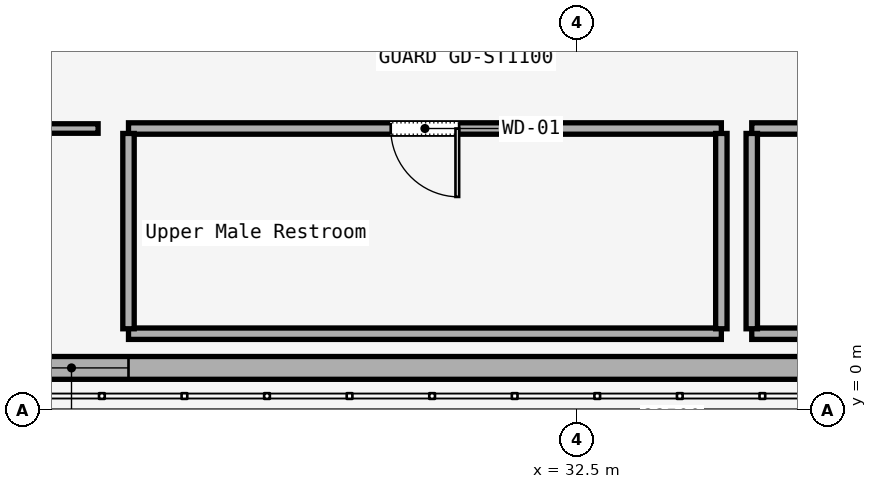
"""IFC4 building model, lengths in metres.
Left out: names, types, materials, properties, quantities, classifications, styles, units other than length and angle.
Written with IfcOpenShell. Run it as: python <this file> out.ifc"""

import sys

from ifc_helpers import new_model, si_unit, direction, frame, frame_2d, origin, place, context, subcontext, project, spatial, rectangle, extrude, element, fill, save


model = new_model("IFC4")
c1 = context("Model", 3, precision=1e-05, world=origin(), true_north=direction((0.0, 1.0)))
c2 = subcontext(c1, "Body", "Model", "MODEL_VIEW")
j1 = project(units=[si_unit("LENGTHUNIT", "METRE"), si_unit("PLANEANGLEUNIT", "RADIAN")], contexts=[c1])
p1 = place(None, origin())
s1 = spatial("IfcSite", under=j1, at=p1, CompositionType="ELEMENT")
p2 = place(p1, origin())
s2 = spatial("IfcBuilding", under=s1, at=p2, CompositionType="ELEMENT")
p3 = place(p2, frame((0.0, 0.0, 18.0)))
s3 = spatial("IfcBuildingStorey", under=s2, at=p3, CompositionType="ELEMENT", Elevation=18.0)
p4 = place(p3, frame((2.3, 0.55, 0.0), z_axis=(0.0, 0.0, 1.0), x_axis=(1.0, 0.0, 0.0)))
e1 = element("IfcWall", 1, at=p4, inside=s3, PredefinedType="SOLIDWALL", context=c2, shape_type="SweptSolid", body=[
    extrude(rectangle(XDim=79.4, YDim=0.3, at=frame_2d((39.7, 0.0))), origin(), (0.0, 0.0, 1.0), 5.7),
])
p5 = place(p4, frame((5.8, 0.0, 1.0)))
e2 = element("IfcOpeningElement", 2, at=p5, cuts=e1, PredefinedType="OPENING", context=c2, shape_type="SweptSolid", body=[
    extrude(rectangle(XDim=1.5, YDim=1.8, at=frame_2d((0.75, 0.9))), frame((0.0, 0.15, 0.0), z_axis=(0.0, -1.0, 0.0), x_axis=(1.0, 0.0, 0.0)), (0.0, 0.0, 1.0), 0.3),
])
p6 = place(p4, frame((12.6, 0.0, 1.0)))
e3 = element("IfcOpeningElement", 3, at=p6, cuts=e1, PredefinedType="OPENING", context=c2, shape_type="SweptSolid", body=[
    extrude(rectangle(XDim=1.5, YDim=1.8, at=frame_2d((0.75, 0.9))), frame((0.0, 0.15, 0.0), z_axis=(0.0, -1.0, 0.0), x_axis=(1.0, 0.0, 0.0)), (0.0, 0.0, 1.0), 0.3),
])
p7 = place(p4, frame((22.8, 0.0, 1.0)))
e4 = element("IfcOpeningElement", 4, at=p7, cuts=e1, PredefinedType="OPENING", context=c2, shape_type="SweptSolid", body=[
    extrude(rectangle(XDim=1.5, YDim=1.8, at=frame_2d((0.75, 0.9))), frame((0.0, 0.15, 0.0), z_axis=(0.0, -1.0, 0.0), x_axis=(1.0, 0.0, 0.0)), (0.0, 0.0, 1.0), 0.3),
])
p8 = place(p4, frame((33.2, 0.0, 1.0)))
e5 = element("IfcOpeningElement", 5, at=p8, cuts=e1, PredefinedType="OPENING", context=c2, shape_type="SweptSolid", body=[
    extrude(rectangle(XDim=1.5, YDim=1.8, at=frame_2d((0.75, 0.9))), frame((0.0, 0.15, 0.0), z_axis=(0.0, -1.0, 0.0), x_axis=(1.0, 0.0, 0.0)), (0.0, 0.0, 1.0), 0.3),
])
p9 = place(p4, frame((44.8, 0.0, 1.0)))
e6 = element("IfcOpeningElement", 6, at=p9, cuts=e1, PredefinedType="OPENING", context=c2, shape_type="SweptSolid", body=[
    extrude(rectangle(XDim=1.5, YDim=1.8, at=frame_2d((0.75, 0.9))), frame((0.0, 0.15, 0.0), z_axis=(0.0, -1.0, 0.0), x_axis=(1.0, 0.0, 0.0)), (0.0, 0.0, 1.0), 0.3),
])
p10 = place(p4, frame((55.2, 0.0, 1.0)))
e7 = element("IfcOpeningElement", 7, at=p10, cuts=e1, PredefinedType="OPENING", context=c2, shape_type="SweptSolid", body=[
    extrude(rectangle(XDim=1.5, YDim=1.8, at=frame_2d((0.75, 0.9))), frame((0.0, 0.15, 0.0), z_axis=(0.0, -1.0, 0.0), x_axis=(1.0, 0.0, 0.0)), (0.0, 0.0, 1.0), 0.3),
])
p11 = place(p4, frame((66.4, 0.0, 1.0)))
e8 = element("IfcOpeningElement", 8, at=p11, cuts=e1, PredefinedType="OPENING", context=c2, shape_type="SweptSolid", body=[
    extrude(rectangle(XDim=1.5, YDim=1.8, at=frame_2d((0.75, 0.9))), frame((0.0, 0.15, 0.0), z_axis=(0.0, -1.0, 0.0), x_axis=(1.0, 0.0, 0.0)), (0.0, 0.0, 1.0), 0.3),
])
p12 = place(p4, frame((73.0, 0.0, 1.0)))
e9 = element("IfcOpeningElement", 9, at=p12, cuts=e1, PredefinedType="OPENING", context=c2, shape_type="SweptSolid", body=[
    extrude(rectangle(XDim=1.5, YDim=1.8, at=frame_2d((0.75, 0.9))), frame((0.0, 0.15, 0.0), z_axis=(0.0, -1.0, 0.0), x_axis=(1.0, 0.0, 0.0)), (0.0, 0.0, 1.0), 0.3),
])
p13 = place(p3, frame((42.6, 3.7, 0.0), z_axis=(0.0, 0.0, 1.0), x_axis=(-1.0, 0.0, 0.0)))
e10 = element("IfcWall", 10, at=p13, inside=s3, PredefinedType="PARTITIONING", context=c2, shape_type="SweptSolid", body=[
    extrude(rectangle(XDim=7.8, YDim=0.15, at=frame_2d((3.9, 0.0))), origin(), (0.0, 0.0, 1.0), 4.47),
])
p14 = place(p13, frame((3.45, 0.0, 0.0)))
e11 = element("IfcOpeningElement", 11, at=p14, cuts=e10, PredefinedType="OPENING", context=c2, shape_type="SweptSolid", body=[
    extrude(rectangle(XDim=0.9, YDim=2.15, at=frame_2d((0.45, 1.075))), frame((0.0, 0.075, 0.0), z_axis=(0.0, -1.0, 0.0), x_axis=(1.0, 0.0, 0.0)), (0.0, 0.0, 1.0), 0.15),
])
p15 = place(p3, frame((34.4, 3.7, 0.0), z_axis=(0.0, 0.0, 1.0), x_axis=(-1.0, 0.0, 0.0)))
e12 = element("IfcWall", 12, at=p15, inside=s3, PredefinedType="PARTITIONING", context=c2, shape_type="SweptSolid", body=[
    extrude(rectangle(XDim=7.8, YDim=0.15, at=frame_2d((3.9, 0.0))), origin(), (0.0, 0.0, 1.0), 4.47),
])
p16 = place(p15, frame((3.45, 0.0, 0.0)))
e13 = element("IfcOpeningElement", 13, at=p16, cuts=e12, PredefinedType="OPENING", context=c2, shape_type="SweptSolid", body=[
    extrude(rectangle(XDim=0.9, YDim=2.15, at=frame_2d((0.45, 1.075))), frame((0.0, 0.075, 0.0), z_axis=(0.0, -1.0, 0.0), x_axis=(1.0, 0.0, 0.0)), (0.0, 0.0, 1.0), 0.15),
])
p17 = place(p3, frame((26.2, 3.7, 0.0), z_axis=(0.0, 0.0, 1.0), x_axis=(-1.0, 0.0, 0.0)))
e14 = element("IfcWall", 14, at=p17, inside=s3, PredefinedType="PARTITIONING", context=c2, shape_type="SweptSolid", body=[
    extrude(rectangle(XDim=2.2, YDim=0.125, at=frame_2d((1.1, 0.0))), origin(), (0.0, 0.0, 1.0), 4.47),
])
p18 = place(p3, frame((34.4, 1.0, 0.0), z_axis=(0.0, 0.0, 1.0), x_axis=(-1.0, 0.0, 0.0)))
e15 = element("IfcWall", 15, at=p18, inside=s3, PredefinedType="PARTITIONING", context=c2, shape_type="SweptSolid", body=[
    extrude(rectangle(XDim=7.8, YDim=0.15, at=frame_2d((3.9, 0.0))), origin(), (0.0, 0.0, 1.0), 4.47),
])
for number, where, z_axis, x_axis in (
    (16, (26.6, 1.065, 0.0), (0.0, 0.0, 1.0), (0.0, 1.0, 0.0)),
    (17, (34.4, 3.635, 0.0), (0.0, 0.0, 1.0), (0.0, -1.0, 0.0)),
):
    element("IfcWall", number, at=place(p3, frame(where, z_axis=z_axis, x_axis=x_axis)), inside=s3, PredefinedType="PARTITIONING", context=c2, shape_type="SweptSolid", body=[
        extrude(rectangle(XDim=2.57, YDim=0.15, at=frame_2d((1.285, 0.0))), origin(), (0.0, 0.0, 1.0), 4.47),
    ])
p19 = place(p3, frame((42.6, 1.0, 0.0), z_axis=(0.0, 0.0, 1.0), x_axis=(-1.0, 0.0, 0.0)))
e18 = element("IfcWall", 18, at=p19, inside=s3, PredefinedType="PARTITIONING", context=c2, shape_type="SweptSolid", body=[
    extrude(rectangle(XDim=7.8, YDim=0.15, at=frame_2d((3.9, 0.0))), origin(), (0.0, 0.0, 1.0), 4.47),
])
p20 = place(p3, frame((34.8, 1.065, 0.0), z_axis=(0.0, 0.0, 1.0), x_axis=(0.0, 1.0, 0.0)))
e19 = element("IfcWall", 19, at=p20, inside=s3, PredefinedType="PARTITIONING", context=c2, shape_type="SweptSolid", body=[
    extrude(rectangle(XDim=2.57, YDim=0.15, at=frame_2d((1.285, 0.0))), origin(), (0.0, 0.0, 1.0), 4.47),
])
p21 = place(p7, origin())
e20 = element("IfcWindow", 20, at=p21, inside=s3, PartitioningType="SINGLE_PANEL", PredefinedType="WINDOW", context=c2, shape_type="SweptSolid", body=[
    extrude(rectangle(XDim=1.5, YDim=1.8, at=frame_2d((0.75, 0.9))), frame((0.0, 0.03, 0.0), z_axis=(0.0, -1.0, 0.0), x_axis=(1.0, 0.0, 0.0)), (0.0, 0.0, 1.0), 0.06),
])
fill(e4, e20)
p22 = place(p16, origin())
e21 = element("IfcDoor", 21, at=p22, inside=s3, OperationType="SINGLE_SWING_RIGHT", PredefinedType="DOOR", context=c2, shape_type="SweptSolid", body=[
    extrude(rectangle(XDim=0.9, YDim=2.15, at=frame_2d((0.45, 1.075))), frame((0.0, 0.025, 0.0), z_axis=(0.0, -1.0, 0.0), x_axis=(1.0, 0.0, 0.0)), (0.0, 0.0, 1.0), 0.05),
])
fill(e13, e21)
save(model, sys.argv[1])
